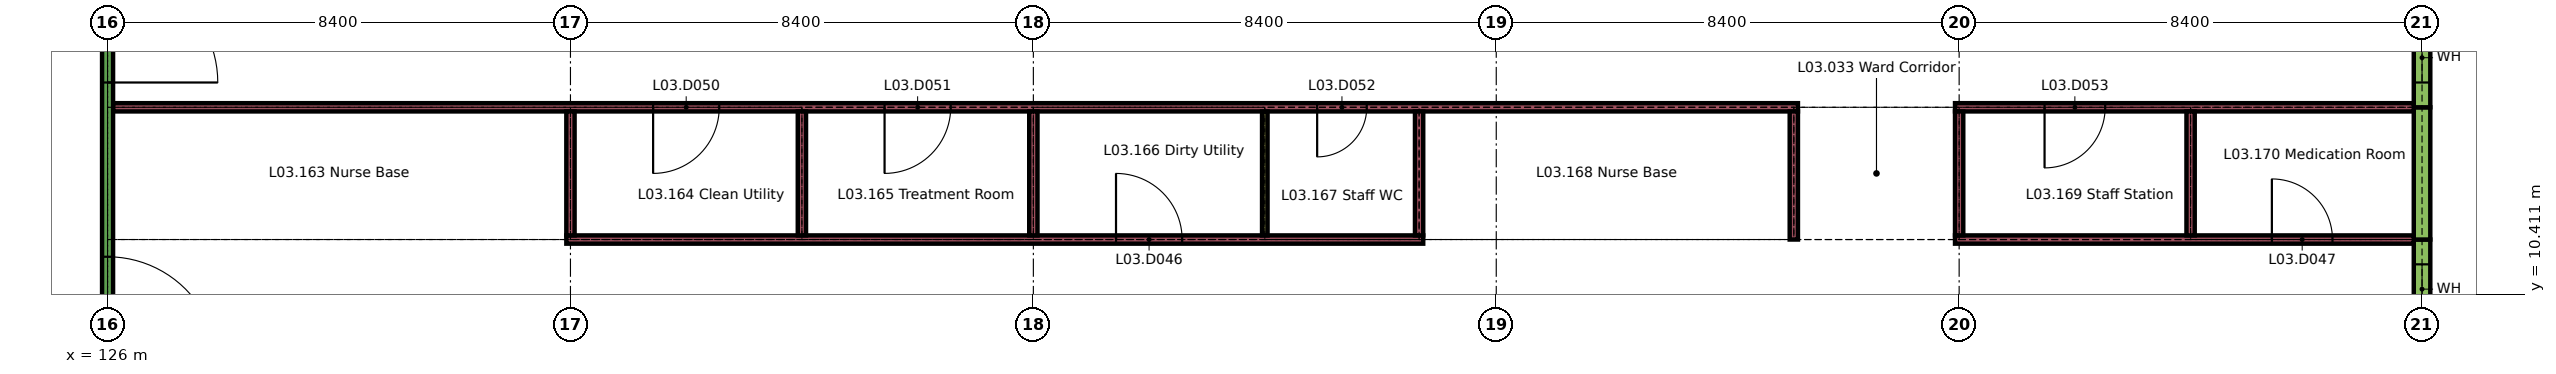
"""IFC4 building model, lengths in metres.
Left out: names, types, materials, properties, quantities, classifications, styles, units other than length and angle.
Written with IfcOpenShell. Run it as: python <this file> out.ifc"""

import sys

from ifc_helpers import new_model, si_unit, direction, frame, frame_2d, origin, place, context, subcontext, project, spatial, rectangle, extrude, element, fill, save


model = new_model("IFC4")
c1 = context("Model", 3, precision=1e-05, world=origin(), true_north=direction((0.0, 1.0)))
c2 = subcontext(c1, "Body", "Model", "MODEL_VIEW")
j1 = project(units=[si_unit("LENGTHUNIT", "METRE"), si_unit("PLANEANGLEUNIT", "RADIAN")], contexts=[c1])
p1 = place(None, origin())
s1 = spatial("IfcSite", under=j1, at=p1, CompositionType="ELEMENT")
p2 = place(p1, origin())
s2 = spatial("IfcBuilding", under=s1, at=p2, CompositionType="ELEMENT")
p3 = place(p2, frame((0.0, 0.0, 15.3)))
s3 = spatial("IfcBuildingStorey", under=s2, at=p3, CompositionType="ELEMENT", Elevation=15.3)
p4 = place(p3, frame((168.0, 8.75, 0.0), z_axis=(0.0, 0.0, 1.0), x_axis=(0.0, 1.0, 0.0)))
e1 = element("IfcWall", 1, at=p4, inside=s3, PredefinedType="SOLIDWALL", context=c2, shape_type="SweptSolid", body=[
    extrude(rectangle(XDim=2.65, YDim=0.3, at=frame_2d((1.325, 0.0))), origin(), (0.0, 0.0, 1.0), 2.96),
])
p5 = place(p4, frame((1.3, 0.0, 0.9)))
e2 = element("IfcOpeningElement", 2, at=p5, cuts=e1, PredefinedType="OPENING", context=c2, shape_type="SweptSolid", body=[
    extrude(rectangle(XDim=0.9, YDim=1.5, at=frame_2d((0.45, 0.75))), frame((0.0, 0.16, 0.0), z_axis=(0.0, -1.0, 0.0), x_axis=(1.0, 0.0, 0.0)), (0.0, 0.0, 1.0), 0.32),
])
p6 = place(p3, frame((168.0, 11.4, 0.0), z_axis=(0.0, 0.0, 1.0), x_axis=(0.0, 1.0, 0.0)))
e3 = element("IfcWall", 3, at=p6, inside=s3, PredefinedType="SOLIDWALL", context=c2, shape_type="SweptSolid", body=[
    extrude(rectangle(XDim=2.4, YDim=0.3, at=frame_2d((1.2, 0.0))), origin(), (0.0, 0.0, 1.0), 2.96),
])
p7 = place(p3, frame((168.0, 13.8, 0.0), z_axis=(0.0, 0.0, 1.0), x_axis=(0.0, 1.0, 0.0)))
e4 = element("IfcWall", 4, at=p7, inside=s3, PredefinedType="SOLIDWALL", context=c2, shape_type="SweptSolid", body=[
    extrude(rectangle(XDim=3.0, YDim=0.3, at=frame_2d((1.5, 0.0))), origin(), (0.0, 0.0, 1.0), 2.96),
])
p8 = place(p7, frame((0.45, 0.0, 0.9)))
e5 = element("IfcOpeningElement", 5, at=p8, cuts=e4, PredefinedType="OPENING", context=c2, shape_type="SweptSolid", body=[
    extrude(rectangle(XDim=0.9, YDim=1.5, at=frame_2d((0.45, 0.75))), frame((0.0, 0.16, 0.0), z_axis=(0.0, -1.0, 0.0), x_axis=(1.0, 0.0, 0.0)), (0.0, 0.0, 1.0), 0.32),
])
p9 = place(p3, frame((134.325, 11.4, 0.0), z_axis=(0.0, 0.0, 1.0), x_axis=(1.0, 0.0, 0.0)))
e6 = element("IfcWall", 6, at=p9, inside=s3, PredefinedType="PARTITIONING", context=c2, shape_type="SweptSolid", body=[
    extrude(rectangle(XDim=15.55, YDim=0.15, at=frame_2d((7.775, 0.0))), origin(), (0.0, 0.0, 1.0), 3.26),
])
p10 = place(p9, frame((9.975, 0.0, 0.0)))
e7 = element("IfcOpeningElement", 7, at=p10, cuts=e6, PredefinedType="OPENING", context=c2, shape_type="SweptSolid", body=[
    extrude(rectangle(XDim=1.2, YDim=2.1, at=frame_2d((0.6, 1.05))), frame((0.0, 0.085, 0.0), z_axis=(0.0, -1.0, 0.0), x_axis=(1.0, 0.0, 0.0)), (0.0, 0.0, 1.0), 0.17),
])
p11 = place(p3, frame((159.525, 11.4, 0.0), z_axis=(0.0, 0.0, 1.0), x_axis=(1.0, 0.0, 0.0)))
e8 = element("IfcWall", 8, at=p11, inside=s3, PredefinedType="PARTITIONING", context=c2, shape_type="SweptSolid", body=[
    extrude(rectangle(XDim=8.325, YDim=0.15, at=frame_2d((4.163, 0.0))), origin(), (0.0, 0.0, 1.0), 3.26),
])
p12 = place(p11, frame((5.75, 0.0, 0.0)))
e9 = element("IfcOpeningElement", 9, at=p12, cuts=e8, PredefinedType="OPENING", context=c2, shape_type="SweptSolid", body=[
    extrude(rectangle(XDim=1.1, YDim=2.1, at=frame_2d((0.55, 1.05))), frame((0.0, 0.085, 0.0), z_axis=(0.0, -1.0, 0.0), x_axis=(1.0, 0.0, 0.0)), (0.0, 0.0, 1.0), 0.17),
])
p13 = place(p3, frame((126.1, 13.8, 0.0), z_axis=(0.0, 0.0, 1.0), x_axis=(1.0, 0.0, 0.0)))
e10 = element("IfcWall", 10, at=p13, inside=s3, PredefinedType="PARTITIONING", context=c2, shape_type="SweptSolid", body=[
    extrude(rectangle(XDim=30.575, YDim=0.15, at=frame_2d((15.288, 0.0))), origin(), (0.0, 0.0, 1.0), 3.26),
])
p14 = place(p13, frame((9.8, 0.0, 0.0)))
e11 = element("IfcOpeningElement", 11, at=p14, cuts=e10, PredefinedType="OPENING", context=c2, shape_type="SweptSolid", body=[
    extrude(rectangle(XDim=1.2, YDim=2.1, at=frame_2d((0.6, 1.05))), frame((0.0, 0.085, 0.0), z_axis=(0.0, -1.0, 0.0), x_axis=(1.0, 0.0, 0.0)), (0.0, 0.0, 1.0), 0.17),
])
p15 = place(p13, frame((14.0, 0.0, 0.0)))
e12 = element("IfcOpeningElement", 12, at=p15, cuts=e10, PredefinedType="OPENING", context=c2, shape_type="SweptSolid", body=[
    extrude(rectangle(XDim=1.2, YDim=2.1, at=frame_2d((0.6, 1.05))), frame((0.0, 0.085, 0.0), z_axis=(0.0, -1.0, 0.0), x_axis=(1.0, 0.0, 0.0)), (0.0, 0.0, 1.0), 0.17),
])
p16 = place(p13, frame((21.85, 0.0, 0.0)))
e13 = element("IfcOpeningElement", 13, at=p16, cuts=e10, PredefinedType="OPENING", context=c2, shape_type="SweptSolid", body=[
    extrude(rectangle(XDim=0.9, YDim=2.1, at=frame_2d((0.45, 1.05))), frame((0.0, 0.085, 0.0), z_axis=(0.0, -1.0, 0.0), x_axis=(1.0, 0.0, 0.0)), (0.0, 0.0, 1.0), 0.17),
])
p17 = place(p3, frame((159.525, 13.8, 0.0), z_axis=(0.0, 0.0, 1.0), x_axis=(1.0, 0.0, 0.0)))
e14 = element("IfcWall", 14, at=p17, inside=s3, PredefinedType="PARTITIONING", context=c2, shape_type="SweptSolid", body=[
    extrude(rectangle(XDim=8.325, YDim=0.15, at=frame_2d((4.163, 0.0))), origin(), (0.0, 0.0, 1.0), 3.26),
])
p18 = place(p17, frame((1.625, 0.0, 0.0)))
e15 = element("IfcOpeningElement", 15, at=p18, cuts=e14, PredefinedType="OPENING", context=c2, shape_type="SweptSolid", body=[
    extrude(rectangle(XDim=1.1, YDim=2.1, at=frame_2d((0.55, 1.05))), frame((0.0, 0.085, 0.0), z_axis=(0.0, -1.0, 0.0), x_axis=(1.0, 0.0, 0.0)), (0.0, 0.0, 1.0), 0.17),
])
p19 = place(p3, frame((126.0, 8.775, 0.0), z_axis=(0.0, 0.0, 1.0), x_axis=(0.0, 1.0, 0.0)))
e16 = element("IfcWall", 16, at=p19, inside=s3, PredefinedType="PARTITIONING", context=c2, shape_type="SweptSolid", body=[
    extrude(rectangle(XDim=7.925, YDim=0.2, at=frame_2d((3.962, 0.0))), origin(), (0.0, 0.0, 1.0), 3.26),
])
p20 = place(p19, frame((0.312, 0.0, 0.0)))
e17 = element("IfcOpeningElement", 17, at=p20, cuts=e16, PredefinedType="OPENING", context=c2, shape_type="SweptSolid", body=[
    extrude(rectangle(XDim=2.0, YDim=2.4, at=frame_2d((1.0, 1.2))), frame((0.0, 0.11, 0.0), z_axis=(0.0, -1.0, 0.0), x_axis=(1.0, 0.0, 0.0)), (0.0, 0.0, 1.0), 0.22),
])
p21 = place(p19, frame((5.475, 0.0, 0.0)))
e18 = element("IfcOpeningElement", 18, at=p21, cuts=e16, PredefinedType="OPENING", context=c2, shape_type="SweptSolid", body=[
    extrude(rectangle(XDim=2.0, YDim=2.4, at=frame_2d((1.0, 1.2))), frame((0.0, 0.11, 0.0), z_axis=(0.0, -1.0, 0.0), x_axis=(1.0, 0.0, 0.0)), (0.0, 0.0, 1.0), 0.22),
])
for number, where, z_axis, x_axis in (
    (19, (134.4, 11.475, 0.0), (0.0, 0.0, 1.0), (0.0, 1.0, 0.0)),
    (20, (138.6, 11.475, 0.0), (0.0, 0.0, 1.0), (0.0, 1.0, 0.0)),
    (21, (142.8, 11.475, 0.0), (0.0, 0.0, 1.0), (0.0, 1.0, 0.0)),
):
    element("IfcWall", number, at=place(p3, frame(where, z_axis=z_axis, x_axis=x_axis)), inside=s3, PredefinedType="PARTITIONING", context=c2, shape_type="SweptSolid", body=[
        extrude(rectangle(XDim=2.25, YDim=0.15, at=frame_2d((1.125, 0.0))), origin(), (0.0, 0.0, 1.0), 3.26),
    ])
p22 = place(p3, frame((147.0, 11.475, 0.0), z_axis=(0.0, 0.0, 1.0), x_axis=(0.0, 1.0, 0.0)))
e22 = element("IfcWall", 22, at=p22, inside=s3, PredefinedType="PARTITIONING", context=c2, shape_type="SweptSolid", body=[
    extrude(rectangle(XDim=2.25, YDim=0.1, at=frame_2d((1.125, 0.0))), origin(), (0.0, 0.0, 1.0), 3.26),
])
p23 = place(p3, frame((149.8, 11.475, 0.0), z_axis=(0.0, 0.0, 1.0), x_axis=(0.0, 1.0, 0.0)))
e23 = element("IfcWall", 23, at=p23, inside=s3, PredefinedType="PARTITIONING", context=c2, shape_type="SweptSolid", body=[
    extrude(rectangle(XDim=2.25, YDim=0.15, at=frame_2d((1.125, 0.0))), origin(), (0.0, 0.0, 1.0), 3.26),
])
p24 = place(p3, frame((156.6, 11.4, 0.0), z_axis=(0.0, 0.0, 1.0), x_axis=(0.0, 1.0, 0.0)))
e24 = element("IfcWall", 24, at=p24, inside=s3, PredefinedType="PARTITIONING", context=c2, shape_type="SweptSolid", body=[
    extrude(rectangle(XDim=2.325, YDim=0.15, at=frame_2d((1.163, 0.0))), origin(), (0.0, 0.0, 1.0), 3.26),
])
for number, where, z_axis, x_axis in (
    (25, (159.6, 11.475, 0.0), (0.0, 0.0, 1.0), (0.0, 1.0, 0.0)),
    (26, (163.8, 11.475, 0.0), (0.0, 0.0, 1.0), (0.0, 1.0, 0.0)),
):
    element("IfcWall", number, at=place(p3, frame(where, z_axis=z_axis, x_axis=x_axis)), inside=s3, PredefinedType="PARTITIONING", context=c2, shape_type="SweptSolid", body=[
        extrude(rectangle(XDim=2.25, YDim=0.15, at=frame_2d((1.125, 0.0))), origin(), (0.0, 0.0, 1.0), 3.26),
    ])
p25 = place(p5, origin())
e27 = element("IfcWindow", 27, at=p25, inside=s3, PartitioningType="SINGLE_PANEL", PredefinedType="WINDOW", context=c2, shape_type="SweptSolid", body=[
    extrude(rectangle(XDim=0.9, YDim=1.5, at=frame_2d((0.45, 0.75))), frame((0.0, 0.03, 0.0), z_axis=(0.0, -1.0, 0.0), x_axis=(1.0, 0.0, 0.0)), (0.0, 0.0, 1.0), 0.06),
])
fill(e2, e27)
p26 = place(p8, origin())
e28 = element("IfcWindow", 28, at=p26, inside=s3, PartitioningType="SINGLE_PANEL", PredefinedType="WINDOW", context=c2, shape_type="SweptSolid", body=[
    extrude(rectangle(XDim=0.9, YDim=1.5, at=frame_2d((0.45, 0.75))), frame((0.0, 0.03, 0.0), z_axis=(0.0, -1.0, 0.0), x_axis=(1.0, 0.0, 0.0)), (0.0, 0.0, 1.0), 0.06),
])
fill(e5, e28)
p27 = place(p10, origin())
e29 = element("IfcDoor", 29, at=p27, inside=s3, OperationType="SINGLE_SWING_RIGHT", PredefinedType="DOOR", context=c2, shape_type="SweptSolid", body=[
    extrude(rectangle(XDim=1.2, YDim=2.1, at=frame_2d((0.6, 1.05))), frame((0.0, 0.025, 0.0), z_axis=(0.0, -1.0, 0.0), x_axis=(1.0, 0.0, 0.0)), (0.0, 0.0, 1.0), 0.05),
])
fill(e7, e29)
p28 = place(p12, origin())
e30 = element("IfcDoor", 30, at=p28, inside=s3, OperationType="SINGLE_SWING_RIGHT", PredefinedType="DOOR", context=c2, shape_type="SweptSolid", body=[
    extrude(rectangle(XDim=1.1, YDim=2.1, at=frame_2d((0.55, 1.05))), frame((0.0, 0.025, 0.0), z_axis=(0.0, -1.0, 0.0), x_axis=(1.0, 0.0, 0.0)), (0.0, 0.0, 1.0), 0.05),
])
fill(e9, e30)
p29 = place(p14, origin())
e31 = element("IfcDoor", 31, at=p29, inside=s3, OperationType="SINGLE_SWING_LEFT", PredefinedType="DOOR", context=c2, shape_type="SweptSolid", body=[
    extrude(rectangle(XDim=1.2, YDim=2.1, at=frame_2d((0.6, 1.05))), frame((0.0, 0.025, 0.0), z_axis=(0.0, -1.0, 0.0), x_axis=(1.0, 0.0, 0.0)), (0.0, 0.0, 1.0), 0.05),
])
fill(e11, e31)
p30 = place(p15, origin())
e32 = element("IfcDoor", 32, at=p30, inside=s3, OperationType="SINGLE_SWING_LEFT", PredefinedType="DOOR", context=c2, shape_type="SweptSolid", body=[
    extrude(rectangle(XDim=1.2, YDim=2.1, at=frame_2d((0.6, 1.05))), frame((0.0, 0.025, 0.0), z_axis=(0.0, -1.0, 0.0), x_axis=(1.0, 0.0, 0.0)), (0.0, 0.0, 1.0), 0.05),
])
fill(e12, e32)
p31 = place(p16, origin())
e33 = element("IfcDoor", 33, at=p31, inside=s3, OperationType="SINGLE_SWING_LEFT", PredefinedType="DOOR", context=c2, shape_type="SweptSolid", body=[
    extrude(rectangle(XDim=0.9, YDim=2.1, at=frame_2d((0.45, 1.05))), frame((0.0, 0.02, 0.0), z_axis=(0.0, -1.0, 0.0), x_axis=(1.0, 0.0, 0.0)), (0.0, 0.0, 1.0), 0.04),
])
fill(e13, e33)
p32 = place(p18, origin())
e34 = element("IfcDoor", 34, at=p32, inside=s3, OperationType="SINGLE_SWING_LEFT", PredefinedType="DOOR", context=c2, shape_type="SweptSolid", body=[
    extrude(rectangle(XDim=1.1, YDim=2.1, at=frame_2d((0.55, 1.05))), frame((0.0, 0.025, 0.0), z_axis=(0.0, -1.0, 0.0), x_axis=(1.0, 0.0, 0.0)), (0.0, 0.0, 1.0), 0.05),
])
fill(e15, e34)
p33 = place(p20, origin())
e35 = element("IfcDoor", 35, at=p33, inside=s3, OperationType="SINGLE_SWING_LEFT", PredefinedType="DOOR", context=c2, shape_type="SweptSolid", body=[
    extrude(rectangle(XDim=2.0, YDim=2.4, at=frame_2d((1.0, 1.2))), frame((0.0, 0.03, 0.0), z_axis=(0.0, -1.0, 0.0), x_axis=(1.0, 0.0, 0.0)), (0.0, 0.0, 1.0), 0.06),
])
fill(e17, e35)
p34 = place(p21, origin())
e36 = element("IfcDoor", 36, at=p34, inside=s3, OperationType="SINGLE_SWING_LEFT", PredefinedType="DOOR", context=c2, shape_type="SweptSolid", body=[
    extrude(rectangle(XDim=2.0, YDim=2.4, at=frame_2d((1.0, 1.2))), frame((0.0, 0.03, 0.0), z_axis=(0.0, -1.0, 0.0), x_axis=(1.0, 0.0, 0.0)), (0.0, 0.0, 1.0), 0.06),
])
fill(e18, e36)
save(model, sys.argv[1])
